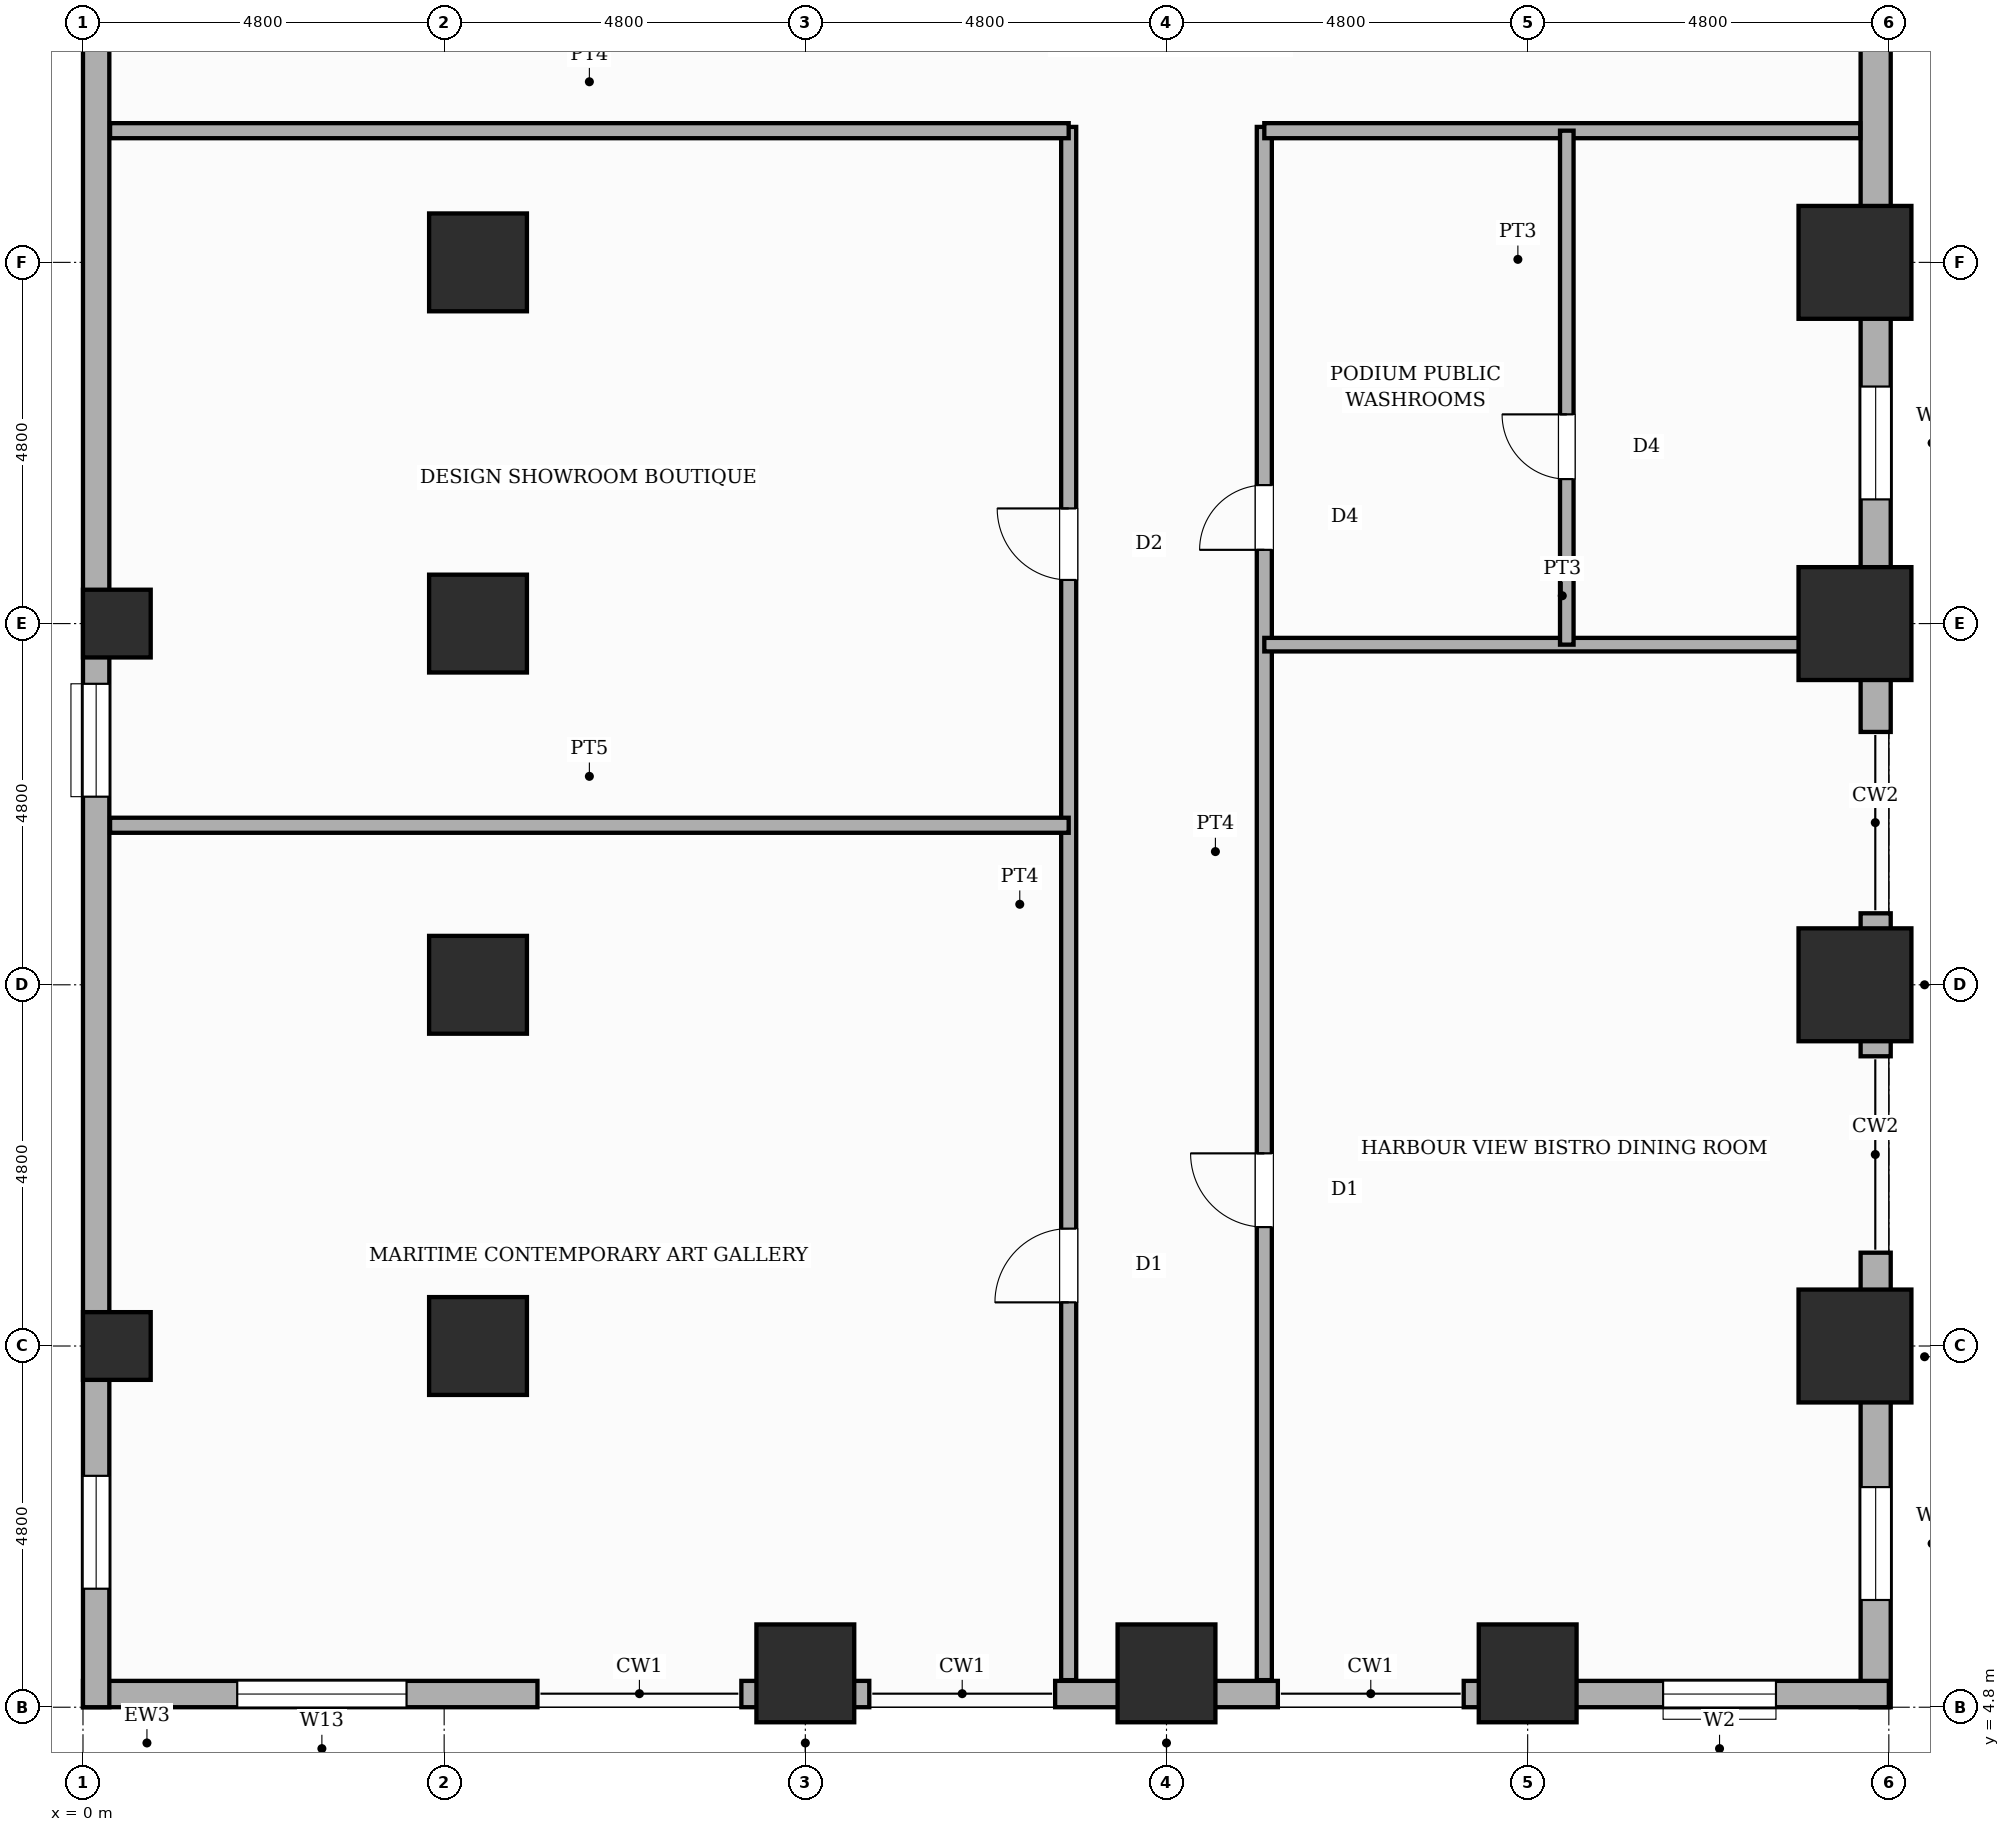
"""IFC4 building model, lengths in metres.
Left out: names, types, materials, properties, quantities, classifications, styles, units other than length and angle.
Written with IfcOpenShell. Run it as: python <this file> out.ifc"""

import sys

from ifc_helpers import new_model, si_unit, direction, frame, frame_2d, origin, origin_2d, place, context, subcontext, project, spatial, rectangle, circle, extrude, element, fill, save


model = new_model("IFC4")
c1 = context("Model", 3, precision=1e-05, world=origin(), true_north=direction((0.0, 1.0)))
c2 = subcontext(c1, "Body", "Model", "MODEL_VIEW")
j1 = project(units=[si_unit("LENGTHUNIT", "METRE"), si_unit("PLANEANGLEUNIT", "RADIAN")], contexts=[c1])
p1 = place(None, origin())
s1 = spatial("IfcSite", under=j1, at=p1, CompositionType="ELEMENT")
p2 = place(p1, origin())
s2 = spatial("IfcBuilding", under=s1, at=p2, CompositionType="ELEMENT")
p3 = place(p2, frame((0.0, 0.0, 5.2)))
s3 = spatial("IfcBuildingStorey", under=s2, at=p3, CompositionType="ELEMENT", Elevation=5.2)
for number, where, z_axis, x_axis in (
    (1, (0.45, 9.6, 0.0), (0.0, 0.0, 1.0), (1.0, 0.0, 0.0)),
    (2, (0.45, 19.2, 0.0), (0.0, 0.0, 1.0), (1.0, 0.0, 0.0)),
):
    element("IfcColumn", number, at=place(p3, frame(where, z_axis=z_axis, x_axis=x_axis)), inside=s3, PredefinedType="COLUMN", context=c2, shape_type="SweptSolid", body=[
        extrude(circle(Radius=0.45, at=origin_2d()), origin(), (0.0, 0.0, 1.0), 4.8),
    ])
for number, where, z_axis, x_axis in (
    (3, (5.25, 9.6, 0.0), (0.0, 0.0, 1.0), (1.0, 0.0, 0.0)),
    (4, (5.25, 14.4, 0.0), (0.0, 0.0, 1.0), (1.0, 0.0, 0.0)),
    (5, (5.25, 19.2, 0.0), (0.0, 0.0, 1.0), (1.0, 0.0, 0.0)),
    (6, (5.25, 24.0, 0.0), (0.0, 0.0, 1.0), (1.0, 0.0, 0.0)),
    (7, (9.6, 5.25, 0.0), (0.0, 0.0, 1.0), (1.0, 0.0, 0.0)),
    (8, (14.4, 5.25, 0.0), (0.0, 0.0, 1.0), (1.0, 0.0, 0.0)),
    (9, (19.2, 5.25, 0.0), (0.0, 0.0, 1.0), (1.0, 0.0, 0.0)),
):
    element("IfcColumn", number, at=place(p3, frame(where, z_axis=z_axis, x_axis=x_axis)), inside=s3, PredefinedType="COLUMN", context=c2, shape_type="SweptSolid", body=[
        extrude(rectangle(XDim=1.3, YDim=1.3, at=origin_2d()), origin(), (0.0, 0.0, 1.0), 4.8),
    ])
for number, where, z_axis, x_axis in (
    (10, (23.55, 9.6, 0.0), (0.0, 0.0, 1.0), (1.0, 0.0, 0.0)),
    (11, (23.55, 14.4, 0.0), (0.0, 0.0, 1.0), (1.0, 0.0, 0.0)),
    (12, (23.55, 19.2, 0.0), (0.0, 0.0, 1.0), (1.0, 0.0, 0.0)),
    (13, (23.55, 24.0, 0.0), (0.0, 0.0, 1.0), (1.0, 0.0, 0.0)),
):
    element("IfcColumn", number, at=place(p3, frame(where, z_axis=z_axis, x_axis=x_axis)), inside=s3, PredefinedType="USERDEFINED", context=c2, shape_type="SweptSolid", body=[
        extrude(rectangle(XDim=1.5, YDim=1.5, at=origin_2d()), origin(), (0.0, 0.0, 1.0), 4.8),
    ])
p4 = place(p3, frame((23.825, 48.0, 0.0), z_axis=(0.0, 0.0, 1.0), x_axis=(0.0, -1.0, 0.0)))
e14 = element("IfcWall", 14, at=p4, inside=s3, PredefinedType="SOLIDWALL", context=c2, shape_type="SweptSolid", body=[
    extrude(rectangle(XDim=30.24, YDim=0.4, at=frame_2d((15.12, 0.0))), origin(), (0.0, 0.0, 1.0), 3.6),
])
p5 = place(p4, frame((25.65, 0.0, 0.85)))
e15 = element("IfcOpeningElement", 15, at=p5, cuts=e14, PredefinedType="OPENING", context=c2, shape_type="SweptSolid", body=[
    extrude(rectangle(XDim=1.5, YDim=2.1, at=frame_2d((0.75, 1.05))), frame((0.0, 0.21, 0.0), z_axis=(0.0, -1.0, 0.0), x_axis=(1.0, 0.0, 0.0)), (0.0, 0.0, 1.0), 0.42),
])
p6 = place(p3, frame((23.825, 15.35, 0.0), z_axis=(0.0, 0.0, 1.0), x_axis=(0.0, -1.0, 0.0)))
e16 = element("IfcWall", 16, at=p6, inside=s3, PredefinedType="SOLIDWALL", context=c2, shape_type="SweptSolid", body=[
    extrude(rectangle(XDim=1.9, YDim=0.4, at=frame_2d((0.95, 0.0))), origin(), (0.0, 0.0, 1.0), 3.6),
])
p7 = place(p3, frame((23.825, 10.84, 0.0), z_axis=(0.0, 0.0, 1.0), x_axis=(0.0, -1.0, 0.0)))
e17 = element("IfcWall", 17, at=p7, inside=s3, PredefinedType="SOLIDWALL", context=c2, shape_type="SweptSolid", body=[
    extrude(rectangle(XDim=6.04, YDim=0.4, at=frame_2d((3.02, 0.0))), origin(), (0.0, 0.0, 1.0), 3.6),
])
p8 = place(p7, frame((3.115, 0.0, 0.85)))
e18 = element("IfcOpeningElement", 18, at=p8, cuts=e17, PredefinedType="OPENING", context=c2, shape_type="SweptSolid", body=[
    extrude(rectangle(XDim=1.5, YDim=2.1, at=frame_2d((0.75, 1.05))), frame((0.0, 0.21, 0.0), z_axis=(0.0, -1.0, 0.0), x_axis=(1.0, 0.0, 0.0)), (0.0, 0.0, 1.0), 0.42),
])
p9 = place(p3, frame((24.0, 4.975, 0.0), z_axis=(0.0, 0.0, 1.0), x_axis=(-1.0, 0.0, 0.0)))
e19 = element("IfcWall", 19, at=p9, inside=s3, PredefinedType="STANDARD", context=c2, shape_type="SweptSolid", body=[
    extrude(rectangle(XDim=5.65, YDim=0.35, at=frame_2d((2.825, 0.0))), origin(), (0.0, 0.0, 1.0), 3.6),
])
p10 = place(p9, frame((1.5, 0.0, 0.85)))
e20 = element("IfcOpeningElement", 20, at=p10, cuts=e19, PredefinedType="OPENING", context=c2, shape_type="SweptSolid", body=[
    extrude(rectangle(XDim=1.5, YDim=2.1, at=frame_2d((0.75, 1.05))), frame((0.0, 0.185, 0.0), z_axis=(0.0, -1.0, 0.0), x_axis=(1.0, 0.0, 0.0)), (0.0, 0.0, 1.0), 0.37),
])
p11 = place(p3, frame((15.88, 4.975, 0.0), z_axis=(0.0, 0.0, 1.0), x_axis=(-1.0, 0.0, 0.0)))
e21 = element("IfcWall", 21, at=p11, inside=s3, PredefinedType="STANDARD", context=c2, shape_type="SweptSolid", body=[
    extrude(rectangle(XDim=2.96, YDim=0.35, at=frame_2d((1.48, 0.0))), origin(), (0.0, 0.0, 1.0), 3.6),
])
p12 = place(p3, frame((10.45, 4.975, 0.0), z_axis=(0.0, 0.0, 1.0), x_axis=(-1.0, 0.0, 0.0)))
e22 = element("IfcWall", 22, at=p12, inside=s3, PredefinedType="STANDARD", context=c2, shape_type="SweptSolid", body=[
    extrude(rectangle(XDim=1.7, YDim=0.35, at=frame_2d((0.85, 0.0))), origin(), (0.0, 0.0, 1.0), 3.6),
])
p13 = place(p3, frame((6.04, 4.975, 0.0), z_axis=(0.0, 0.0, 1.0), x_axis=(-1.0, 0.0, 0.0)))
e23 = element("IfcWall", 23, at=p13, inside=s3, PredefinedType="STANDARD", context=c2, shape_type="SweptSolid", body=[
    extrude(rectangle(XDim=6.04, YDim=0.35, at=frame_2d((3.02, 0.0))), origin(), (0.0, 0.0, 1.0), 4.52),
])
p14 = place(p13, frame((1.74, 0.0, 0.85)))
e24 = element("IfcOpeningElement", 24, at=p14, cuts=e23, PredefinedType="OPENING", context=c2, shape_type="SweptSolid", body=[
    extrude(rectangle(XDim=2.25, YDim=2.85, at=frame_2d((1.125, 1.425))), frame((0.0, 0.185, 0.0), z_axis=(0.0, -1.0, 0.0), x_axis=(1.0, 0.0, 0.0)), (0.0, 0.0, 1.0), 0.37),
])
p15 = place(p3, frame((0.175, 4.8, 0.0), z_axis=(0.0, 0.0, 1.0), x_axis=(0.0, 1.0, 0.0)))
e25 = element("IfcWall", 25, at=p15, inside=s3, PredefinedType="STANDARD", context=c2, shape_type="SweptSolid", body=[
    extrude(rectangle(XDim=43.2, YDim=0.35, at=frame_2d((21.6, 0.0))), origin(), (0.0, 0.0, 1.0), 3.6),
])
p16 = place(p15, frame((1.575, 0.0, 0.85)))
e26 = element("IfcOpeningElement", 26, at=p16, cuts=e25, PredefinedType="OPENING", context=c2, shape_type="SweptSolid", body=[
    extrude(rectangle(XDim=1.5, YDim=2.1, at=frame_2d((0.75, 1.05))), frame((0.0, 0.185, 0.0), z_axis=(0.0, -1.0, 0.0), x_axis=(1.0, 0.0, 0.0)), (0.0, 0.0, 1.0), 0.37),
])
p17 = place(p15, frame((12.1, 0.0, 0.85)))
e27 = element("IfcOpeningElement", 27, at=p17, cuts=e25, PredefinedType="OPENING", context=c2, shape_type="SweptSolid", body=[
    extrude(rectangle(XDim=1.5, YDim=2.1, at=frame_2d((0.75, 1.05))), frame((0.0, 0.185, 0.0), z_axis=(0.0, -1.0, 0.0), x_axis=(1.0, 0.0, 0.0)), (0.0, 0.0, 1.0), 0.37),
])
p18 = place(p3, frame((13.1, 5.16, 0.0), z_axis=(0.0, 0.0, 1.0), x_axis=(0.0, 1.0, 0.0)))
e28 = element("IfcWall", 28, at=p18, inside=s3, PredefinedType="PARTITIONING", context=c2, shape_type="SweptSolid", body=[
    extrude(rectangle(XDim=20.64, YDim=0.2, at=frame_2d((10.32, 0.0))), origin(), (0.0, 0.0, 1.0), 4.52),
])
p19 = place(p18, frame((5.02, 0.0, 0.0)))
e29 = element("IfcOpeningElement", 29, at=p19, cuts=e28, PredefinedType="OPENING", context=c2, shape_type="SweptSolid", body=[
    extrude(rectangle(XDim=0.98, YDim=2.18, at=frame_2d((0.49, 1.09))), frame((0.0, 0.11, 0.0), z_axis=(0.0, -1.0, 0.0), x_axis=(1.0, 0.0, 0.0)), (0.0, 0.0, 1.0), 0.22),
])
p20 = place(p18, frame((14.62, 0.0, 0.0)))
e30 = element("IfcOpeningElement", 30, at=p20, cuts=e28, PredefinedType="OPENING", context=c2, shape_type="SweptSolid", body=[
    extrude(rectangle(XDim=0.95, YDim=2.15, at=frame_2d((0.475, 1.075))), frame((0.0, 0.11, 0.0), z_axis=(0.0, -1.0, 0.0), x_axis=(1.0, 0.0, 0.0)), (0.0, 0.0, 1.0), 0.22),
])
p21 = place(p3, frame((15.7, 5.16, 0.0), z_axis=(0.0, 0.0, 1.0), x_axis=(0.0, 1.0, 0.0)))
e31 = element("IfcWall", 31, at=p21, inside=s3, PredefinedType="PARTITIONING", context=c2, shape_type="SweptSolid", body=[
    extrude(rectangle(XDim=20.64, YDim=0.2, at=frame_2d((10.32, 0.0))), origin(), (0.0, 0.0, 1.0), 4.52),
])
p22 = place(p21, frame((6.02, 0.0, 0.0)))
e32 = element("IfcOpeningElement", 32, at=p22, cuts=e31, PredefinedType="OPENING", context=c2, shape_type="SweptSolid", body=[
    extrude(rectangle(XDim=0.98, YDim=2.18, at=frame_2d((0.49, 1.09))), frame((0.0, 0.11, 0.0), z_axis=(0.0, -1.0, 0.0), x_axis=(1.0, 0.0, 0.0)), (0.0, 0.0, 1.0), 0.22),
])
p23 = place(p21, frame((15.02, 0.0, 0.0)))
e33 = element("IfcOpeningElement", 33, at=p23, cuts=e31, PredefinedType="OPENING", context=c2, shape_type="SweptSolid", body=[
    extrude(rectangle(XDim=0.86, YDim=2.1, at=frame_2d((0.43, 1.05))), frame((0.0, 0.11, 0.0), z_axis=(0.0, -1.0, 0.0), x_axis=(1.0, 0.0, 0.0)), (0.0, 0.0, 1.0), 0.22),
])
p24 = place(p3, frame((0.36, 25.75, 0.0), z_axis=(0.0, 0.0, 1.0), x_axis=(1.0, 0.0, 0.0)))
e34 = element("IfcWall", 34, at=p24, inside=s3, PredefinedType="PARTITIONING", context=c2, shape_type="SweptSolid", body=[
    extrude(rectangle(XDim=12.74, YDim=0.2, at=frame_2d((6.37, 0.0))), origin(), (0.0, 0.0, 1.0), 4.52),
])
p25 = place(p3, frame((15.7, 25.75, 0.0), z_axis=(0.0, 0.0, 1.0), x_axis=(1.0, 0.0, 0.0)))
e35 = element("IfcWall", 35, at=p25, inside=s3, PredefinedType="PARTITIONING", context=c2, shape_type="SweptSolid", body=[
    extrude(rectangle(XDim=7.92, YDim=0.2, at=frame_2d((3.96, 0.0))), origin(), (0.0, 0.0, 1.0), 4.52),
])
p26 = place(p3, frame((0.36, 16.52, 0.0), z_axis=(0.0, 0.0, 1.0), x_axis=(1.0, 0.0, 0.0)))
e36 = element("IfcWall", 36, at=p26, inside=s3, PredefinedType="SOLIDWALL", context=c2, shape_type="SweptSolid", body=[
    extrude(rectangle(XDim=12.74, YDim=0.2, at=frame_2d((6.37, 0.0))), origin(), (0.0, 0.0, 1.0), 4.52),
])
p27 = place(p3, frame((15.7, 18.92, 0.0), z_axis=(0.0, 0.0, 1.0), x_axis=(1.0, 0.0, 0.0)))
e37 = element("IfcWall", 37, at=p27, inside=s3, PredefinedType="PLUMBINGWALL", context=c2, shape_type="SweptSolid", body=[
    extrude(rectangle(XDim=7.92, YDim=0.18, at=frame_2d((3.96, 0.0))), origin(), (0.0, 0.0, 1.0), 3.6),
])
p28 = place(p3, frame((19.72, 18.92, 0.0), z_axis=(0.0, 0.0, 1.0), x_axis=(0.0, 1.0, 0.0)))
e38 = element("IfcWall", 38, at=p28, inside=s3, PredefinedType="PLUMBINGWALL", context=c2, shape_type="SweptSolid", body=[
    extrude(rectangle(XDim=6.83, YDim=0.18, at=frame_2d((3.415, 0.0))), origin(), (0.0, 0.0, 1.0), 4.52),
])
p29 = place(p28, frame((2.2, 0.0, 0.0)))
e39 = element("IfcOpeningElement", 39, at=p29, cuts=e38, PredefinedType="OPENING", context=c2, shape_type="SweptSolid", body=[
    extrude(rectangle(XDim=0.86, YDim=2.1, at=frame_2d((0.43, 1.05))), frame((0.0, 0.1, 0.0), z_axis=(0.0, -1.0, 0.0), x_axis=(1.0, 0.0, 0.0)), (0.0, 0.0, 1.0), 0.2),
])
p30 = place(p5, origin())
e40 = element("IfcWindow", 40, at=p30, inside=s3, PartitioningType="SINGLE_PANEL", PredefinedType="WINDOW", context=c2, shape_type="SweptSolid", body=[
    extrude(rectangle(XDim=1.5, YDim=2.1, at=frame_2d((0.75, 1.05))), frame((0.0, 0.03, 0.0), z_axis=(0.0, -1.0, 0.0), x_axis=(1.0, 0.0, 0.0)), (0.0, 0.0, 1.0), 0.06),
])
fill(e15, e40)
p31 = place(p8, origin())
e41 = element("IfcWindow", 41, at=p31, inside=s3, PartitioningType="SINGLE_PANEL", PredefinedType="WINDOW", context=c2, shape_type="SweptSolid", body=[
    extrude(rectangle(XDim=1.5, YDim=2.1, at=frame_2d((0.75, 1.05))), frame((0.0, 0.03, 0.0), z_axis=(0.0, -1.0, 0.0), x_axis=(1.0, 0.0, 0.0)), (0.0, 0.0, 1.0), 0.06),
])
fill(e18, e41)
p32 = place(p10, origin())
e42 = element("IfcWindow", 42, at=p32, inside=s3, PartitioningType="SINGLE_PANEL", PredefinedType="WINDOW", context=c2, shape_type="SweptSolid", body=[
    extrude(rectangle(XDim=1.5, YDim=2.1, at=frame_2d((0.75, 1.05))), frame((0.0, 0.03, 0.0), z_axis=(0.0, -1.0, 0.0), x_axis=(1.0, 0.0, 0.0)), (0.0, 0.0, 1.0), 0.06),
])
fill(e20, e42)
p33 = place(p14, origin())
e43 = element("IfcWindow", 43, at=p33, inside=s3, PartitioningType="SINGLE_PANEL", PredefinedType="WINDOW", context=c2, shape_type="SweptSolid", body=[
    extrude(rectangle(XDim=2.25, YDim=2.85, at=frame_2d((1.125, 1.425))), frame((0.0, 0.03, 0.0), z_axis=(0.0, -1.0, 0.0), x_axis=(1.0, 0.0, 0.0)), (0.0, 0.0, 1.0), 0.06),
])
fill(e24, e43)
p34 = place(p16, origin())
e44 = element("IfcWindow", 44, at=p34, inside=s3, PartitioningType="SINGLE_PANEL", PredefinedType="WINDOW", context=c2, shape_type="SweptSolid", body=[
    extrude(rectangle(XDim=1.5, YDim=2.1, at=frame_2d((0.75, 1.05))), frame((0.0, 0.03, 0.0), z_axis=(0.0, -1.0, 0.0), x_axis=(1.0, 0.0, 0.0)), (0.0, 0.0, 1.0), 0.06),
])
fill(e26, e44)
p35 = place(p17, origin())
e45 = element("IfcWindow", 45, at=p35, inside=s3, PartitioningType="SINGLE_PANEL", PredefinedType="WINDOW", context=c2, shape_type="SweptSolid", body=[
    extrude(rectangle(XDim=1.5, YDim=2.1, at=frame_2d((0.75, 1.05))), frame((0.0, 0.03, 0.0), z_axis=(0.0, -1.0, 0.0), x_axis=(1.0, 0.0, 0.0)), (0.0, 0.0, 1.0), 0.06),
])
fill(e27, e45)
p36 = place(p19, origin())
e46 = element("IfcDoor", 46, at=p36, inside=s3, OperationType="SINGLE_SWING_LEFT", PredefinedType="DOOR", context=c2, shape_type="SweptSolid", body=[
    extrude(rectangle(XDim=0.98, YDim=2.18, at=frame_2d((0.49, 1.09))), frame((0.0, 0.025, 0.0), z_axis=(0.0, -1.0, 0.0), x_axis=(1.0, 0.0, 0.0)), (0.0, 0.0, 1.0), 0.05),
])
fill(e29, e46)
p37 = place(p20, origin())
e47 = element("IfcDoor", 47, at=p37, inside=s3, OperationType="SINGLE_SWING_RIGHT", PredefinedType="DOOR", context=c2, shape_type="SweptSolid", body=[
    extrude(rectangle(XDim=0.95, YDim=2.15, at=frame_2d((0.475, 1.075))), frame((0.0, 0.025, 0.0), z_axis=(0.0, -1.0, 0.0), x_axis=(1.0, 0.0, 0.0)), (0.0, 0.0, 1.0), 0.05),
])
fill(e30, e47)
p38 = place(p22, origin())
e48 = element("IfcDoor", 48, at=p38, inside=s3, OperationType="SINGLE_SWING_RIGHT", PredefinedType="DOOR", context=c2, shape_type="SweptSolid", body=[
    extrude(rectangle(XDim=0.98, YDim=2.18, at=frame_2d((0.49, 1.09))), frame((0.0, 0.025, 0.0), z_axis=(0.0, -1.0, 0.0), x_axis=(1.0, 0.0, 0.0)), (0.0, 0.0, 1.0), 0.05),
])
fill(e32, e48)
p39 = place(p23, origin())
e49 = element("IfcDoor", 49, at=p39, inside=s3, OperationType="SINGLE_SWING_LEFT", PredefinedType="DOOR", context=c2, shape_type="SweptSolid", body=[
    extrude(rectangle(XDim=0.86, YDim=2.1, at=frame_2d((0.43, 1.05))), frame((0.0, 0.025, 0.0), z_axis=(0.0, -1.0, 0.0), x_axis=(1.0, 0.0, 0.0)), (0.0, 0.0, 1.0), 0.05),
])
fill(e33, e49)
p40 = place(p29, origin())
e50 = element("IfcDoor", 50, at=p40, inside=s3, OperationType="SINGLE_SWING_RIGHT", PredefinedType="DOOR", context=c2, shape_type="SweptSolid", body=[
    extrude(rectangle(XDim=0.86, YDim=2.1, at=frame_2d((0.43, 1.05))), frame((0.0, 0.025, 0.0), z_axis=(0.0, -1.0, 0.0), x_axis=(1.0, 0.0, 0.0)), (0.0, 0.0, 1.0), 0.05),
])
fill(e39, e50)
save(model, sys.argv[1])
